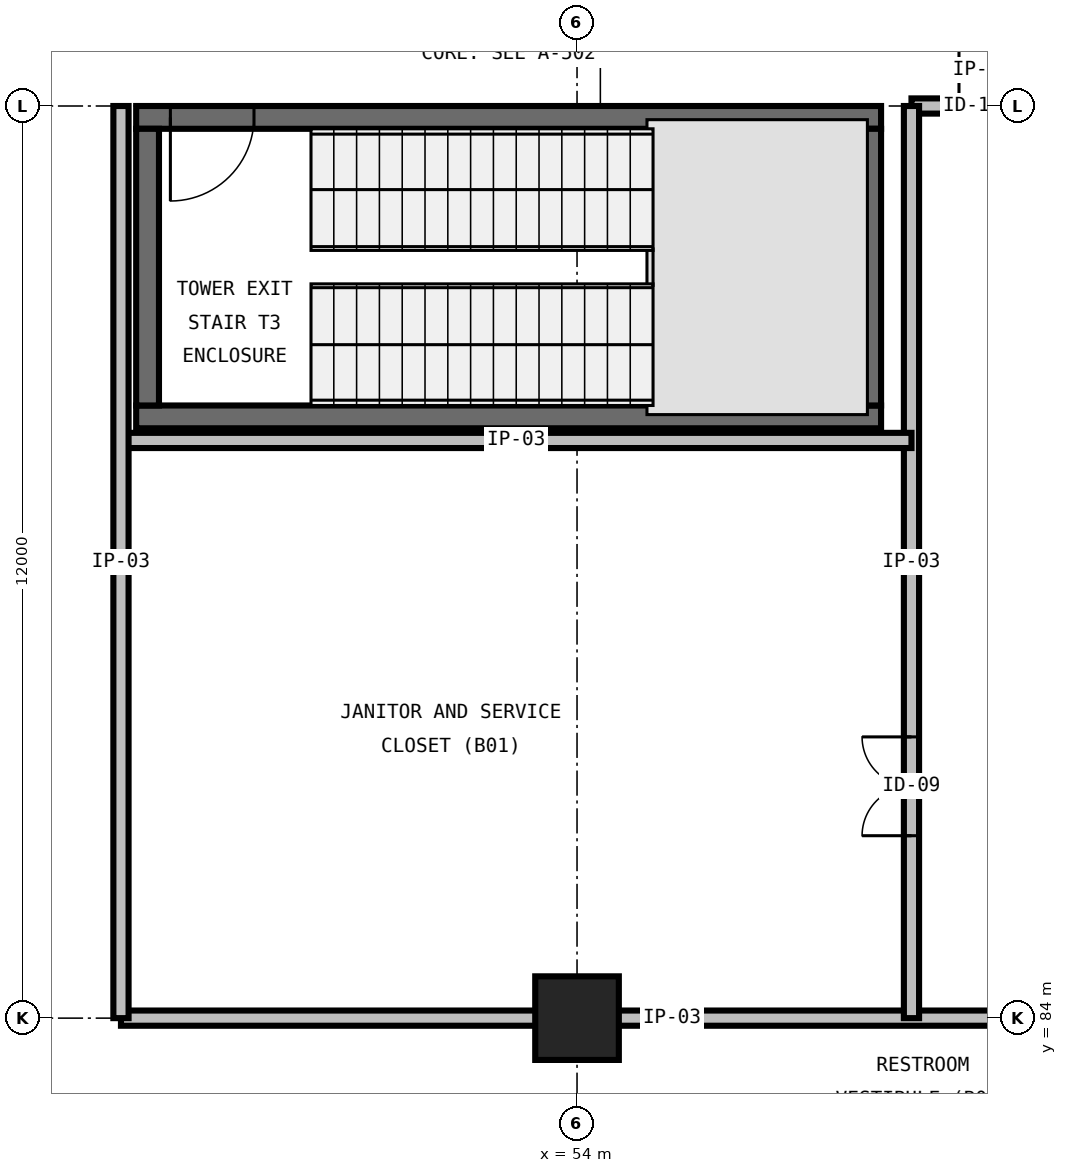
"""IFC4 building model, lengths in metres.
Left out: names, types, materials, properties, quantities, classifications, styles, units other than length and angle.
Written with IfcOpenShell. Run it as: python <this file> out.ifc"""

import sys

from ifc_helpers import new_model, si_unit, direction, frame, frame_2d, origin, origin_2d, place, context, subcontext, project, spatial, rectangle, extrude, element, fill, save


model = new_model("IFC4")
c1 = context("Model", 3, precision=1e-05, world=origin(), true_north=direction((0.0, 1.0)))
c2 = subcontext(c1, "Body", "Model", "MODEL_VIEW")
j1 = project(units=[si_unit("LENGTHUNIT", "METRE"), si_unit("PLANEANGLEUNIT", "RADIAN")], contexts=[c1])
p1 = place(None, origin())
s1 = spatial("IfcSite", under=j1, at=p1, CompositionType="ELEMENT")
p2 = place(p1, origin())
s2 = spatial("IfcBuilding", under=s1, at=p2, CompositionType="ELEMENT")
p3 = place(p2, frame((0.0, 0.0, -5.4)))
s3 = spatial("IfcBuildingStorey", under=s2, at=p3, CompositionType="ELEMENT", Elevation=-5.4)
p4 = place(p3, frame((54.0, 84.0, 0.0), z_axis=(0.0, 0.0, 1.0), x_axis=(1.0, 0.0, 0.0)))
e1 = element("IfcColumn", 1, at=p4, inside=s3, PredefinedType="COLUMN", context=c2, shape_type="SweptSolid", body=[
    extrude(rectangle(XDim=1.1, YDim=1.1, at=origin_2d()), origin(), (0.0, 0.0, 1.0), 5.4),
])
p5 = place(p3, frame((48.2, 91.91, 0.0), z_axis=(0.0, 0.0, 1.0), x_axis=(1.0, 0.0, 0.0)))
e2 = element("IfcWall", 2, at=p5, inside=s3, PredefinedType="SHEAR", context=c2, shape_type="SweptSolid", body=[
    extrude(rectangle(XDim=9.8, YDim=0.3, at=frame_2d((4.9, 0.0))), origin(), (0.0, 0.0, 1.0), 5.4),
])
p6 = place(p3, frame((58.0, 95.85, 0.0), z_axis=(0.0, 0.0, 1.0), x_axis=(-1.0, 0.0, 0.0)))
e3 = element("IfcWall", 3, at=p6, inside=s3, PredefinedType="SHEAR", context=c2, shape_type="SweptSolid", body=[
    extrude(rectangle(XDim=9.8, YDim=0.3, at=frame_2d((4.9, 0.0))), origin(), (0.0, 0.0, 1.0), 5.4),
])
p7 = place(p6, frame((8.25, 0.0, 0.0)))
e4 = element("IfcOpeningElement", 4, at=p7, cuts=e3, PredefinedType="OPENING", context=c2, shape_type="SweptSolid", body=[
    extrude(rectangle(XDim=1.1, YDim=2.2, at=frame_2d((0.55, 1.1))), frame((0.0, 0.165, 0.0), z_axis=(0.0, -1.0, 0.0), x_axis=(1.0, 0.0, 0.0)), (0.0, 0.0, 1.0), 0.33),
])
for number, where, z_axis, x_axis in (
    (5, (48.35, 95.7, 0.0), (0.0, 0.0, 1.0), (0.0, -1.0, 0.0)),
    (6, (57.85, 92.06, 0.0), (0.0, 0.0, 1.0), (0.0, 1.0, 0.0)),
):
    element("IfcWall", number, at=place(p3, frame(where, z_axis=z_axis, x_axis=x_axis)), inside=s3, PredefinedType="SHEAR", context=c2, shape_type="SweptSolid", body=[
        extrude(rectangle(XDim=3.64, YDim=0.3, at=frame_2d((1.82, 0.0))), origin(), (0.0, 0.0, 1.0), 5.4),
    ])
p8 = place(p3, frame((48.0, 84.0, 0.0), z_axis=(0.0, 0.0, 1.0), x_axis=(1.0, 0.0, 0.0)))
e7 = element("IfcWall", 7, at=p8, inside=s3, PredefinedType="PARTITIONING", context=c2, shape_type="SweptSolid", body=[
    extrude(rectangle(XDim=18.0, YDim=0.2, at=frame_2d((9.0, 0.0))), origin(), (0.0, 0.0, 1.0), 4.242),
])
p9 = place(p3, frame((58.4, 96.0, 0.0), z_axis=(0.0, 0.0, 1.0), x_axis=(1.0, 0.0, 0.0)))
e8 = element("IfcWall", 8, at=p9, inside=s3, PredefinedType="PARTITIONING", context=c2, shape_type="SweptSolid", body=[
    extrude(rectangle(XDim=2.4, YDim=0.2, at=frame_2d((1.2, 0.0))), origin(), (0.0, 0.0, 1.0), 4.089),
])
p10 = place(p9, frame((0.625, 0.0, 0.0)))
e9 = element("IfcOpeningElement", 9, at=p10, cuts=e8, PredefinedType="OPENING", context=c2, shape_type="SweptSolid", body=[
    extrude(rectangle(XDim=0.95, YDim=2.15, at=frame_2d((0.475, 1.075))), frame((0.0, 0.115, 0.0), z_axis=(0.0, -1.0, 0.0), x_axis=(1.0, 0.0, 0.0)), (0.0, 0.0, 1.0), 0.23),
])
p11 = place(p3, frame((58.4, 84.0, 0.0), z_axis=(0.0, 0.0, 1.0), x_axis=(0.0, 1.0, 0.0)))
e10 = element("IfcWall", 10, at=p11, inside=s3, PredefinedType="PARTITIONING", context=c2, shape_type="SweptSolid", body=[
    extrude(rectangle(XDim=12.0, YDim=0.2, at=frame_2d((6.0, 0.0))), origin(), (0.0, 0.0, 1.0), 4.96),
])
p12 = place(p11, frame((2.4, 0.0, 0.0)))
e11 = element("IfcOpeningElement", 11, at=p12, cuts=e10, PredefinedType="OPENING", context=c2, shape_type="SweptSolid", body=[
    extrude(rectangle(XDim=1.3, YDim=2.2, at=frame_2d((0.65, 1.1))), frame((0.0, 0.115, 0.0), z_axis=(0.0, -1.0, 0.0), x_axis=(1.0, 0.0, 0.0)), (0.0, 0.0, 1.0), 0.23),
])
p13 = place(p3, frame((48.0, 91.6, 0.0), z_axis=(0.0, 0.0, 1.0), x_axis=(1.0, 0.0, 0.0)))
e12 = element("IfcWall", 12, at=p13, inside=s3, PredefinedType="PARTITIONING", context=c2, shape_type="SweptSolid", body=[
    extrude(rectangle(XDim=10.4, YDim=0.2, at=frame_2d((5.2, 0.0))), origin(), (0.0, 0.0, 1.0), 4.96),
])
p14 = place(p3, frame((48.0, 84.0, 0.0), z_axis=(0.0, 0.0, 1.0), x_axis=(0.0, 1.0, 0.0)))
e13 = element("IfcWall", 13, at=p14, inside=s3, PredefinedType="PARTITIONING", context=c2, shape_type="SweptSolid", body=[
    extrude(rectangle(XDim=12.0, YDim=0.2, at=frame_2d((6.0, 0.0))), origin(), (0.0, 0.0, 1.0), 4.96),
])
p15 = place(p7, origin())
e14 = element("IfcDoor", 14, at=p15, inside=s3, OperationType="SINGLE_SWING_RIGHT", PredefinedType="DOOR", context=c2, shape_type="SweptSolid", body=[
    extrude(rectangle(XDim=1.1, YDim=2.2, at=frame_2d((0.55, 1.1))), frame((0.0, 0.025, 0.0), z_axis=(0.0, -1.0, 0.0), x_axis=(1.0, 0.0, 0.0)), (0.0, 0.0, 1.0), 0.05),
])
fill(e4, e14)
p16 = place(p10, origin())
e15 = element("IfcDoor", 15, at=p16, inside=s3, OperationType="SINGLE_SWING_LEFT", PredefinedType="DOOR", context=c2, shape_type="SweptSolid", body=[
    extrude(rectangle(XDim=0.95, YDim=2.15, at=frame_2d((0.475, 1.075))), frame((0.0, 0.025, 0.0), z_axis=(0.0, -1.0, 0.0), x_axis=(1.0, 0.0, 0.0)), (0.0, 0.0, 1.0), 0.05),
])
fill(e9, e15)
p17 = place(p12, origin())
e16 = element("IfcDoor", 16, at=p17, inside=s3, OperationType="DOUBLE_DOOR_SINGLE_SWING", PredefinedType="DOOR", context=c2, shape_type="SweptSolid", body=[
    extrude(rectangle(XDim=1.3, YDim=2.2, at=frame_2d((0.65, 1.1))), frame((0.0, 0.025, 0.0), z_axis=(0.0, -1.0, 0.0), x_axis=(1.0, 0.0, 0.0)), (0.0, 0.0, 1.0), 0.05),
])
fill(e11, e16)
save(model, sys.argv[1])
